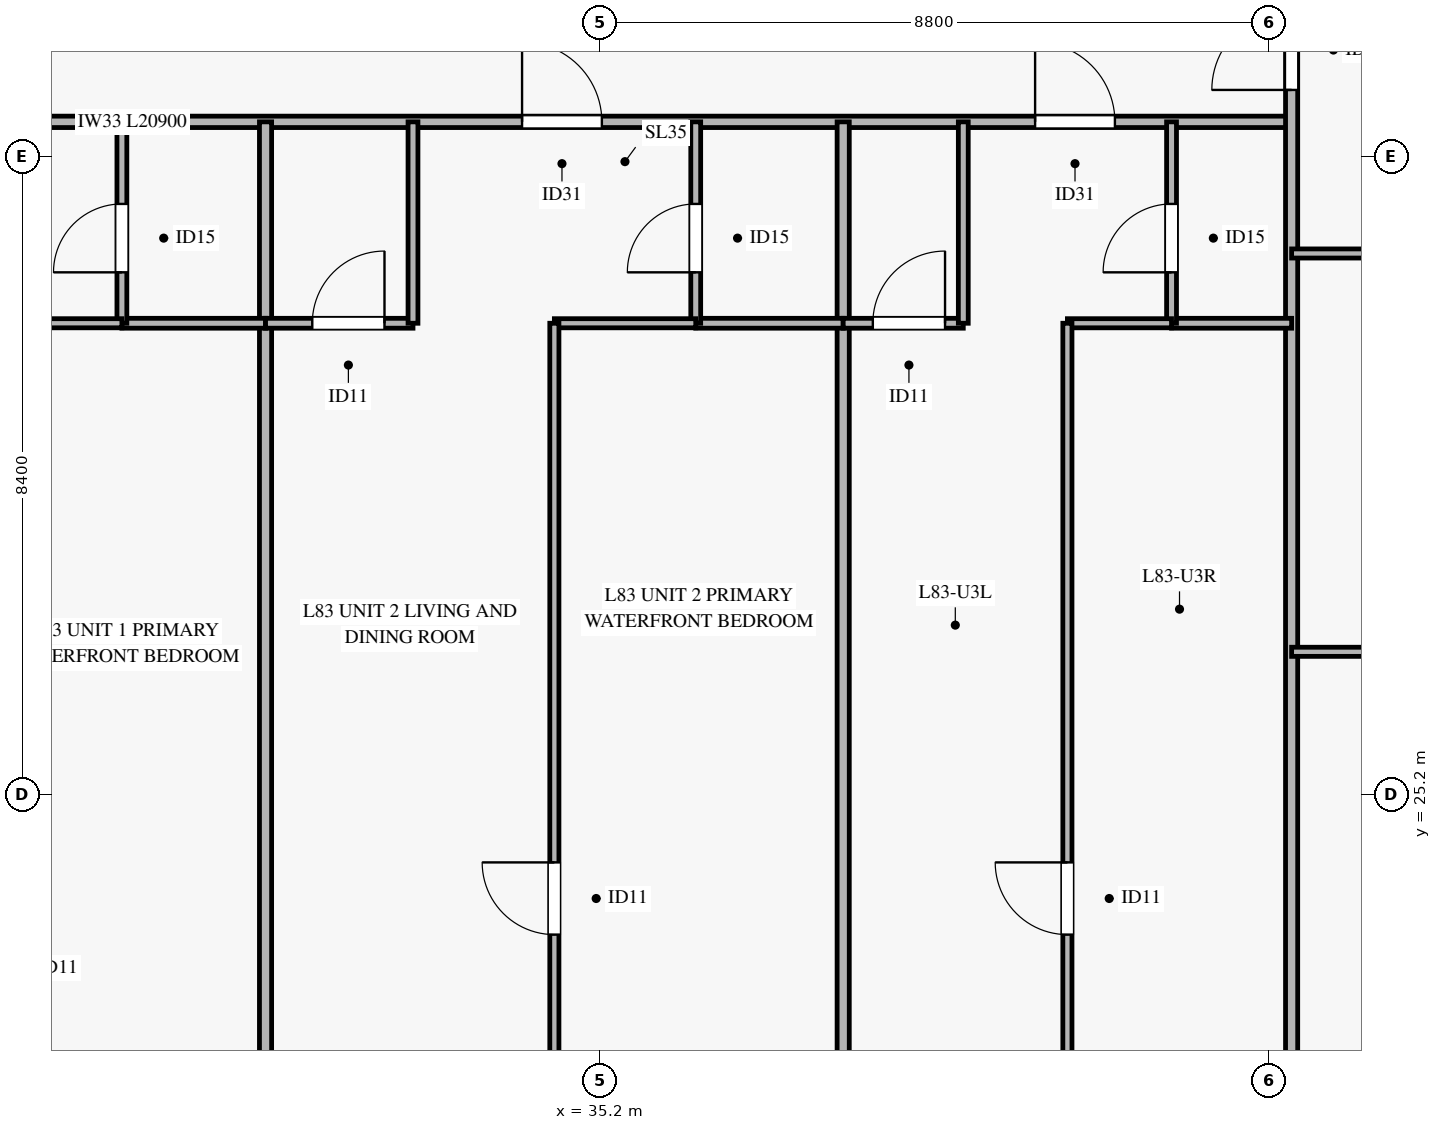
"""IFC4 building model, lengths in metres.
Left out: names, types, materials, properties, quantities, classifications, styles, units other than length and angle.
Written with IfcOpenShell. Run it as: python <this file> out.ifc"""

import sys

from ifc_helpers import new_model, si_unit, direction, frame, frame_2d, origin, place, context, subcontext, project, spatial, rectangle, extrude, source, transform, mapped, element, fill, save


model = new_model("IFC4")
c1 = context("Model", 3, precision=1e-05, world=origin(), true_north=direction((0.0, 1.0)))
c2 = subcontext(c1, "Body", "Model", "MODEL_VIEW")
j1 = project(units=[si_unit("LENGTHUNIT", "METRE"), si_unit("PLANEANGLEUNIT", "RADIAN")], contexts=[c1])
p1 = place(None, origin())
s1 = spatial("IfcSite", under=j1, at=p1, CompositionType="ELEMENT")
p2 = place(p1, origin())
s2 = spatial("IfcBuilding", under=s1, at=p2, CompositionType="ELEMENT")
p3 = place(p2, frame((0.0, 0.0, 321.0)))
s3 = spatial("IfcBuildingStorey", under=s2, at=p3, CompositionType="ELEMENT", Elevation=321.0)
p4 = place(p3, frame((23.4, 34.05, 0.0), z_axis=(0.0, 0.0, 1.0), x_axis=(1.0, 0.0, 0.0)))
e1 = element("IfcWall", 1, at=p4, inside=s3, PredefinedType="PARTITIONING", context=c2, shape_type="SweptSolid", body=[
    extrude(rectangle(XDim=20.9, YDim=0.15, at=frame_2d((10.45, 0.0))), origin(), (0.0, 0.0, 1.0), 2.47),
])
p5 = place(p4, frame((3.275, 0.0, 0.0)))
e2 = element("IfcOpeningElement", 2, at=p5, cuts=e1, PredefinedType="OPENING", context=c2, shape_type="SweptSolid", body=[
    extrude(rectangle(XDim=1.05, YDim=2.15, at=frame_2d((0.525, 1.075))), frame((0.0, 0.085, 0.0), z_axis=(0.0, -1.0, 0.0), x_axis=(1.0, 0.0, 0.0)), (0.0, 0.0, 1.0), 0.17),
])
p6 = place(p4, frame((10.775, 0.0, 0.0)))
e3 = element("IfcOpeningElement", 3, at=p6, cuts=e1, PredefinedType="OPENING", context=c2, shape_type="SweptSolid", body=[
    extrude(rectangle(XDim=1.05, YDim=2.15, at=frame_2d((0.525, 1.075))), frame((0.0, 0.085, 0.0), z_axis=(0.0, -1.0, 0.0), x_axis=(1.0, 0.0, 0.0)), (0.0, 0.0, 1.0), 0.17),
])
p7 = place(p4, frame((17.525, 0.0, 0.0)))
e4 = element("IfcOpeningElement", 4, at=p7, cuts=e1, PredefinedType="OPENING", context=c2, shape_type="SweptSolid", body=[
    extrude(rectangle(XDim=1.05, YDim=2.15, at=frame_2d((0.525, 1.075))), frame((0.0, 0.085, 0.0), z_axis=(0.0, -1.0, 0.0), x_axis=(1.0, 0.0, 0.0)), (0.0, 0.0, 1.0), 0.17),
])
p8 = place(p3, frame((30.8, 20.704, 0.0), z_axis=(0.0, 0.0, 1.0), x_axis=(0.0, 1.0, 0.0)))
e5 = element("IfcWall", 5, at=p8, inside=s3, PredefinedType="PARTITIONING", context=c2, shape_type="SweptSolid", body=[
    extrude(rectangle(XDim=13.346, YDim=0.16, at=frame_2d((6.673, 0.0))), origin(), (0.0, 0.0, 1.0), 2.47),
])
p9 = place(p3, frame((38.4, 20.704, 0.0), z_axis=(0.0, 0.0, 1.0), x_axis=(0.0, 1.0, 0.0)))
e6 = element("IfcWall", 6, at=p9, inside=s3, PredefinedType="PARTITIONING", context=c2, shape_type="SweptSolid", body=[
    extrude(rectangle(XDim=13.346, YDim=0.16, at=frame_2d((6.673, 0.0))), origin(), (0.0, 0.0, 1.0), 2.77),
])
p10 = place(p3, frame((44.3, 20.704, 0.0), z_axis=(0.0, 0.0, 1.0), x_axis=(0.0, 1.0, 0.0)))
e7 = element("IfcWall", 7, at=p10, inside=s3, PredefinedType="PARTITIONING", context=c2, shape_type="SweptSolid", body=[
    extrude(rectangle(XDim=16.746, YDim=0.16, at=frame_2d((8.373, 0.0))), origin(), (0.0, 0.0, 1.0), 2.47),
])
p11 = place(p10, frame((13.766, 0.0, 0.0)))
e8 = element("IfcOpeningElement", 8, at=p11, cuts=e7, PredefinedType="OPENING", context=c2, shape_type="SweptSolid", body=[
    extrude(rectangle(XDim=1.05, YDim=2.15, at=frame_2d((0.525, 1.075))), frame((0.0, 0.09, 0.0), z_axis=(0.0, -1.0, 0.0), x_axis=(1.0, 0.0, 0.0)), (0.0, 0.0, 1.0), 0.18),
])
p12 = place(p3, frame((28.91, 31.4, 0.0), z_axis=(0.0, 0.0, 1.0), x_axis=(1.0, 0.0, 0.0)))
e9 = element("IfcWall", 9, at=p12, inside=s3, PredefinedType="PARTITIONING", context=c2, shape_type="SweptSolid", body=[
    extrude(rectangle(XDim=1.89, YDim=0.13, at=frame_2d((0.945, 0.0))), origin(), (0.0, 0.0, 1.0), 2.47),
])
p13 = place(p3, frame((28.91, 31.4, 0.0), z_axis=(0.0, 0.0, 1.0), x_axis=(0.0, 1.0, 0.0)))
e10 = element("IfcWall", 10, at=p13, inside=s3, PredefinedType="PARTITIONING", context=c2, shape_type="SweptSolid", body=[
    extrude(rectangle(XDim=2.65, YDim=0.13, at=frame_2d((1.325, 0.0))), origin(), (0.0, 0.0, 1.0), 2.77),
])
p14 = place(p13, frame((0.67, 0.0, 0.0)))
e11 = element("IfcOpeningElement", 11, at=p14, cuts=e10, PredefinedType="OPENING", context=c2, shape_type="SweptSolid", body=[
    extrude(rectangle(XDim=0.9, YDim=2.1, at=frame_2d((0.45, 1.05))), frame((0.0, 0.075, 0.0), z_axis=(0.0, -1.0, 0.0), x_axis=(1.0, 0.0, 0.0)), (0.0, 0.0, 1.0), 0.15),
])
p15 = place(p3, frame((27.1, 31.4, 0.0), z_axis=(0.0, 0.0, 1.0), x_axis=(1.0, 0.0, 0.0)))
e12 = element("IfcWall", 12, at=p15, inside=s3, PredefinedType="PARTITIONING", context=c2, shape_type="SweptSolid", body=[
    extrude(rectangle(XDim=1.81, YDim=0.12, at=frame_2d((0.905, 0.0))), origin(), (0.0, 0.0, 1.0), 3.185),
])
p16 = place(p3, frame((30.8, 31.4, 0.0), z_axis=(0.0, 0.0, 1.0), x_axis=(1.0, 0.0, 0.0)))
e13 = element("IfcWall", 13, at=p16, inside=s3, PredefinedType="PARTITIONING", context=c2, shape_type="SweptSolid", body=[
    extrude(rectangle(XDim=1.94, YDim=0.13, at=frame_2d((0.97, 0.0))), origin(), (0.0, 0.0, 1.0), 2.47),
])
p17 = place(p16, frame((0.615, 0.0, 0.0)))
e14 = element("IfcOpeningElement", 14, at=p17, cuts=e13, PredefinedType="OPENING", context=c2, shape_type="SweptSolid", body=[
    extrude(rectangle(XDim=0.95, YDim=2.1, at=frame_2d((0.475, 1.05))), frame((0.0, 0.075, 0.0), z_axis=(0.0, -1.0, 0.0), x_axis=(1.0, 0.0, 0.0)), (0.0, 0.0, 1.0), 0.15),
])
p18 = place(p3, frame((32.74, 31.4, 0.0), z_axis=(0.0, 0.0, 1.0), x_axis=(0.0, 1.0, 0.0)))
e15 = element("IfcWall", 15, at=p18, inside=s3, PredefinedType="PARTITIONING", context=c2, shape_type="SweptSolid", body=[
    extrude(rectangle(XDim=2.65, YDim=0.13, at=frame_2d((1.325, 0.0))), origin(), (0.0, 0.0, 1.0), 2.77),
])
p19 = place(p3, frame((36.46, 31.4, 0.0), z_axis=(0.0, 0.0, 1.0), x_axis=(1.0, 0.0, 0.0)))
e16 = element("IfcWall", 16, at=p19, inside=s3, PredefinedType="PARTITIONING", context=c2, shape_type="SweptSolid", body=[
    extrude(rectangle(XDim=1.94, YDim=0.13, at=frame_2d((0.97, 0.0))), origin(), (0.0, 0.0, 1.0), 2.47),
])
p20 = place(p3, frame((36.46, 31.4, 0.0), z_axis=(0.0, 0.0, 1.0), x_axis=(0.0, 1.0, 0.0)))
e17 = element("IfcWall", 17, at=p20, inside=s3, PredefinedType="PARTITIONING", context=c2, shape_type="SweptSolid", body=[
    extrude(rectangle(XDim=2.65, YDim=0.13, at=frame_2d((1.325, 0.0))), origin(), (0.0, 0.0, 1.0), 2.77),
])
p21 = place(p20, frame((0.67, 0.0, 0.0)))
e18 = element("IfcOpeningElement", 18, at=p21, cuts=e17, PredefinedType="OPENING", context=c2, shape_type="SweptSolid", body=[
    extrude(rectangle(XDim=0.9, YDim=2.1, at=frame_2d((0.45, 1.05))), frame((0.0, 0.075, 0.0), z_axis=(0.0, -1.0, 0.0), x_axis=(1.0, 0.0, 0.0)), (0.0, 0.0, 1.0), 0.15),
])
p22 = place(p3, frame((34.6, 31.4, 0.0), z_axis=(0.0, 0.0, 1.0), x_axis=(1.0, 0.0, 0.0)))
e19 = element("IfcWall", 19, at=p22, inside=s3, PredefinedType="PARTITIONING", context=c2, shape_type="SweptSolid", body=[
    extrude(rectangle(XDim=1.86, YDim=0.12, at=frame_2d((0.93, 0.0))), origin(), (0.0, 0.0, 1.0), 3.185),
])
p23 = place(p3, frame((34.6, 20.704, 0.0), z_axis=(0.0, 0.0, 1.0), x_axis=(0.0, 1.0, 0.0)))
e20 = element("IfcWall", 20, at=p23, inside=s3, PredefinedType="PARTITIONING", context=c2, shape_type="SweptSolid", body=[
    extrude(rectangle(XDim=10.696, YDim=0.12, at=frame_2d((5.348, 0.0))), origin(), (0.0, 0.0, 1.0), 2.77),
])
p24 = place(p23, frame((2.652, 0.0, 0.0)))
e21 = element("IfcOpeningElement", 21, at=p24, cuts=e20, PredefinedType="OPENING", context=c2, shape_type="SweptSolid", body=[
    extrude(rectangle(XDim=0.95, YDim=2.1, at=frame_2d((0.475, 1.05))), frame((0.0, 0.07, 0.0), z_axis=(0.0, -1.0, 0.0), x_axis=(1.0, 0.0, 0.0)), (0.0, 0.0, 1.0), 0.14),
])
p25 = place(p3, frame((38.4, 31.4, 0.0), z_axis=(0.0, 0.0, 1.0), x_axis=(1.0, 0.0, 0.0)))
e22 = element("IfcWall", 22, at=p25, inside=s3, PredefinedType="PARTITIONING", context=c2, shape_type="SweptSolid", body=[
    extrude(rectangle(XDim=1.58, YDim=0.13, at=frame_2d((0.79, 0.0))), origin(), (0.0, 0.0, 1.0), 3.185),
])
p26 = place(p25, frame((0.39, 0.0, 0.0)))
e23 = element("IfcOpeningElement", 23, at=p26, cuts=e22, PredefinedType="OPENING", context=c2, shape_type="SweptSolid", body=[
    extrude(rectangle(XDim=0.95, YDim=2.1, at=frame_2d((0.475, 1.05))), frame((0.0, 0.075, 0.0), z_axis=(0.0, -1.0, 0.0), x_axis=(1.0, 0.0, 0.0)), (0.0, 0.0, 1.0), 0.15),
])
p27 = place(p3, frame((39.98, 31.4, 0.0), z_axis=(0.0, 0.0, 1.0), x_axis=(0.0, 1.0, 0.0)))
e24 = element("IfcWall", 24, at=p27, inside=s3, PredefinedType="PARTITIONING", context=c2, shape_type="SweptSolid", body=[
    extrude(rectangle(XDim=2.65, YDim=0.13, at=frame_2d((1.325, 0.0))), origin(), (0.0, 0.0, 1.0), 2.77),
])
p28 = place(p3, frame((42.72, 31.4, 0.0), z_axis=(0.0, 0.0, 1.0), x_axis=(1.0, 0.0, 0.0)))
e25 = element("IfcWall", 25, at=p28, inside=s3, PredefinedType="PARTITIONING", context=c2, shape_type="SweptSolid", body=[
    extrude(rectangle(XDim=1.58, YDim=0.13, at=frame_2d((0.79, 0.0))), origin(), (0.0, 0.0, 1.0), 2.47),
])
p29 = place(p3, frame((42.72, 31.4, 0.0), z_axis=(0.0, 0.0, 1.0), x_axis=(0.0, 1.0, 0.0)))
e26 = element("IfcWall", 26, at=p29, inside=s3, PredefinedType="PARTITIONING", context=c2, shape_type="SweptSolid", body=[
    extrude(rectangle(XDim=2.65, YDim=0.13, at=frame_2d((1.325, 0.0))), origin(), (0.0, 0.0, 1.0), 2.77),
])
p30 = place(p29, frame((0.67, 0.0, 0.0)))
e27 = element("IfcOpeningElement", 27, at=p30, cuts=e26, PredefinedType="OPENING", context=c2, shape_type="SweptSolid", body=[
    extrude(rectangle(XDim=0.9, YDim=2.1, at=frame_2d((0.45, 1.05))), frame((0.0, 0.075, 0.0), z_axis=(0.0, -1.0, 0.0), x_axis=(1.0, 0.0, 0.0)), (0.0, 0.0, 1.0), 0.15),
])
p31 = place(p3, frame((41.35, 31.4, 0.0), z_axis=(0.0, 0.0, 1.0), x_axis=(1.0, 0.0, 0.0)))
e28 = element("IfcWall", 28, at=p31, inside=s3, PredefinedType="PARTITIONING", context=c2, shape_type="SweptSolid", body=[
    extrude(rectangle(XDim=1.37, YDim=0.12, at=frame_2d((0.685, 0.0))), origin(), (0.0, 0.0, 1.0), 3.185),
])
p32 = place(p3, frame((41.35, 20.704, 0.0), z_axis=(0.0, 0.0, 1.0), x_axis=(0.0, 1.0, 0.0)))
e29 = element("IfcWall", 29, at=p32, inside=s3, PredefinedType="PARTITIONING", context=c2, shape_type="SweptSolid", body=[
    extrude(rectangle(XDim=10.696, YDim=0.12, at=frame_2d((5.348, 0.0))), origin(), (0.0, 0.0, 1.0), 2.77),
])
p33 = place(p32, frame((2.652, 0.0, 0.0)))
e30 = element("IfcOpeningElement", 30, at=p33, cuts=e29, PredefinedType="OPENING", context=c2, shape_type="SweptSolid", body=[
    extrude(rectangle(XDim=0.95, YDim=2.1, at=frame_2d((0.475, 1.05))), frame((0.0, 0.07, 0.0), z_axis=(0.0, -1.0, 0.0), x_axis=(1.0, 0.0, 0.0)), (0.0, 0.0, 1.0), 0.14),
])
p34 = place(p3, frame((44.3, 27.077, 0.0), z_axis=(0.0, 0.0, 1.0), x_axis=(1.0, 0.0, 0.0)))
e31 = element("IfcWall", 31, at=p34, inside=s3, PredefinedType="PARTITIONING", context=c2, shape_type="SweptSolid", body=[
    extrude(rectangle(XDim=15.246, YDim=0.12, at=frame_2d((7.623, 0.0))), origin(), (0.0, 0.0, 1.0), 2.47),
])
p35 = place(p34, frame((6.018, 0.0, 0.0)))
e32 = element("IfcOpeningElement", 32, at=p35, cuts=e31, PredefinedType="OPENING", context=c2, shape_type="SweptSolid", body=[
    extrude(rectangle(XDim=0.95, YDim=2.1, at=frame_2d((0.475, 1.05))), frame((0.0, 0.07, 0.0), z_axis=(0.0, -1.0, 0.0), x_axis=(1.0, 0.0, 0.0)), (0.0, 0.0, 1.0), 0.14),
])
p36 = place(p3, frame((44.3, 32.318, 0.0), z_axis=(0.0, 0.0, 1.0), x_axis=(1.0, 0.0, 0.0)))
e33 = element("IfcWall", 33, at=p36, inside=s3, PredefinedType="PARTITIONING", context=c2, shape_type="SweptSolid", body=[
    extrude(rectangle(XDim=15.246, YDim=0.12, at=frame_2d((7.623, 0.0))), origin(), (0.0, 0.0, 1.0), 2.47),
])
p37 = place(p36, frame((6.018, 0.0, 0.0)))
e34 = element("IfcOpeningElement", 34, at=p37, cuts=e33, PredefinedType="OPENING", context=c2, shape_type="SweptSolid", body=[
    extrude(rectangle(XDim=0.95, YDim=2.1, at=frame_2d((0.475, 1.05))), frame((0.0, 0.07, 0.0), z_axis=(0.0, -1.0, 0.0), x_axis=(1.0, 0.0, 0.0)), (0.0, 0.0, 1.0), 0.14),
])
m1 = source(origin(), c2, "Body", "SweptSolid", [
    extrude(rectangle(XDim=0.9, YDim=2.1, at=frame_2d((0.45, 1.05))), frame((0.0, 0.025, 0.0), z_axis=(0.0, -1.0, 0.0), x_axis=(1.0, 0.0, 0.0)), (0.0, 0.0, 1.0), 0.05),
])
p38 = place(p14, origin())
e35 = element("IfcDoor", 35, at=p38, inside=s3, OperationType="SINGLE_SWING_LEFT", PredefinedType="DOOR", context=c2, shape_type="MappedRepresentation", body=[
    mapped(m1, transform((0.0, 0.0, 0.0), x_axis=(1.0, 0.0, 0.0), y_axis=(0.0, 1.0, 0.0), z_axis=(0.0, 0.0, 1.0), scale=1.0)),
])
fill(e11, e35)
m2 = source(origin(), c2, "Body", "SweptSolid", [
    extrude(rectangle(XDim=1.05, YDim=2.15, at=frame_2d((0.525, 1.075))), frame((0.0, 0.025, 0.0), z_axis=(0.0, -1.0, 0.0), x_axis=(1.0, 0.0, 0.0)), (0.0, 0.0, 1.0), 0.05),
])
p39 = place(p6, origin())
e36 = element("IfcDoor", 36, at=p39, inside=s3, OperationType="SINGLE_SWING_LEFT", PredefinedType="DOOR", context=c2, shape_type="MappedRepresentation", body=[
    mapped(m2, transform((0.0, 0.0, 0.0), x_axis=(1.0, 0.0, 0.0), y_axis=(0.0, 1.0, 0.0), z_axis=(0.0, 0.0, 1.0), scale=1.0)),
])
fill(e3, e36)
m3 = source(origin(), c2, "Body", "SweptSolid", [
    extrude(rectangle(XDim=0.95, YDim=2.1, at=frame_2d((0.475, 1.05))), frame((0.0, 0.025, 0.0), z_axis=(0.0, -1.0, 0.0), x_axis=(1.0, 0.0, 0.0)), (0.0, 0.0, 1.0), 0.05),
])
p40 = place(p17, origin())
e37 = element("IfcDoor", 37, at=p40, inside=s3, OperationType="SINGLE_SWING_RIGHT", PredefinedType="DOOR", context=c2, shape_type="MappedRepresentation", body=[
    mapped(m3, transform((0.0, 0.0, 0.0), x_axis=(1.0, 0.0, 0.0), y_axis=(0.0, 1.0, 0.0), z_axis=(0.0, 0.0, 1.0), scale=1.0)),
])
fill(e14, e37)
p41 = place(p21, origin())
e38 = element("IfcDoor", 38, at=p41, inside=s3, OperationType="SINGLE_SWING_LEFT", PredefinedType="DOOR", context=c2, shape_type="MappedRepresentation", body=[
    mapped(m1, transform((0.0, 0.0, 0.0), x_axis=(1.0, 0.0, 0.0), y_axis=(0.0, 1.0, 0.0), z_axis=(0.0, 0.0, 1.0), scale=1.0)),
])
fill(e18, e38)
p42 = place(p24, origin())
e39 = element("IfcDoor", 39, at=p42, inside=s3, OperationType="SINGLE_SWING_RIGHT", PredefinedType="DOOR", context=c2, shape_type="MappedRepresentation", body=[
    mapped(m3, transform((0.0, 0.0, 0.0), x_axis=(1.0, 0.0, 0.0), y_axis=(0.0, 1.0, 0.0), z_axis=(0.0, 0.0, 1.0), scale=1.0)),
])
fill(e21, e39)
p43 = place(p7, origin())
e40 = element("IfcDoor", 40, at=p43, inside=s3, OperationType="SINGLE_SWING_LEFT", PredefinedType="DOOR", context=c2, shape_type="MappedRepresentation", body=[
    mapped(m2, transform((0.0, 0.0, 0.0), x_axis=(1.0, 0.0, 0.0), y_axis=(0.0, 1.0, 0.0), z_axis=(0.0, 0.0, 1.0), scale=1.0)),
])
fill(e4, e40)
p44 = place(p26, origin())
e41 = element("IfcDoor", 41, at=p44, inside=s3, OperationType="SINGLE_SWING_RIGHT", PredefinedType="DOOR", context=c2, shape_type="MappedRepresentation", body=[
    mapped(m3, transform((0.0, 0.0, 0.0), x_axis=(1.0, 0.0, 0.0), y_axis=(0.0, 1.0, 0.0), z_axis=(0.0, 0.0, 1.0), scale=1.0)),
])
fill(e23, e41)
p45 = place(p30, origin())
e42 = element("IfcDoor", 42, at=p45, inside=s3, OperationType="SINGLE_SWING_LEFT", PredefinedType="DOOR", context=c2, shape_type="MappedRepresentation", body=[
    mapped(m1, transform((0.0, 0.0, 0.0), x_axis=(1.0, 0.0, 0.0), y_axis=(0.0, 1.0, 0.0), z_axis=(0.0, 0.0, 1.0), scale=1.0)),
])
fill(e27, e42)
p46 = place(p33, origin())
e43 = element("IfcDoor", 43, at=p46, inside=s3, OperationType="SINGLE_SWING_RIGHT", PredefinedType="DOOR", context=c2, shape_type="MappedRepresentation", body=[
    mapped(m3, transform((0.0, 0.0, 0.0), x_axis=(1.0, 0.0, 0.0), y_axis=(0.0, 1.0, 0.0), z_axis=(0.0, 0.0, 1.0), scale=1.0)),
])
fill(e30, e43)
p47 = place(p11, origin())
e44 = element("IfcDoor", 44, at=p47, inside=s3, OperationType="SINGLE_SWING_LEFT", PredefinedType="DOOR", context=c2, shape_type="MappedRepresentation", body=[
    mapped(m2, transform((0.0, 0.0, 0.0), x_axis=(1.0, 0.0, 0.0), y_axis=(0.0, 1.0, 0.0), z_axis=(0.0, 0.0, 1.0), scale=1.0)),
])
fill(e8, e44)
save(model, sys.argv[1])
